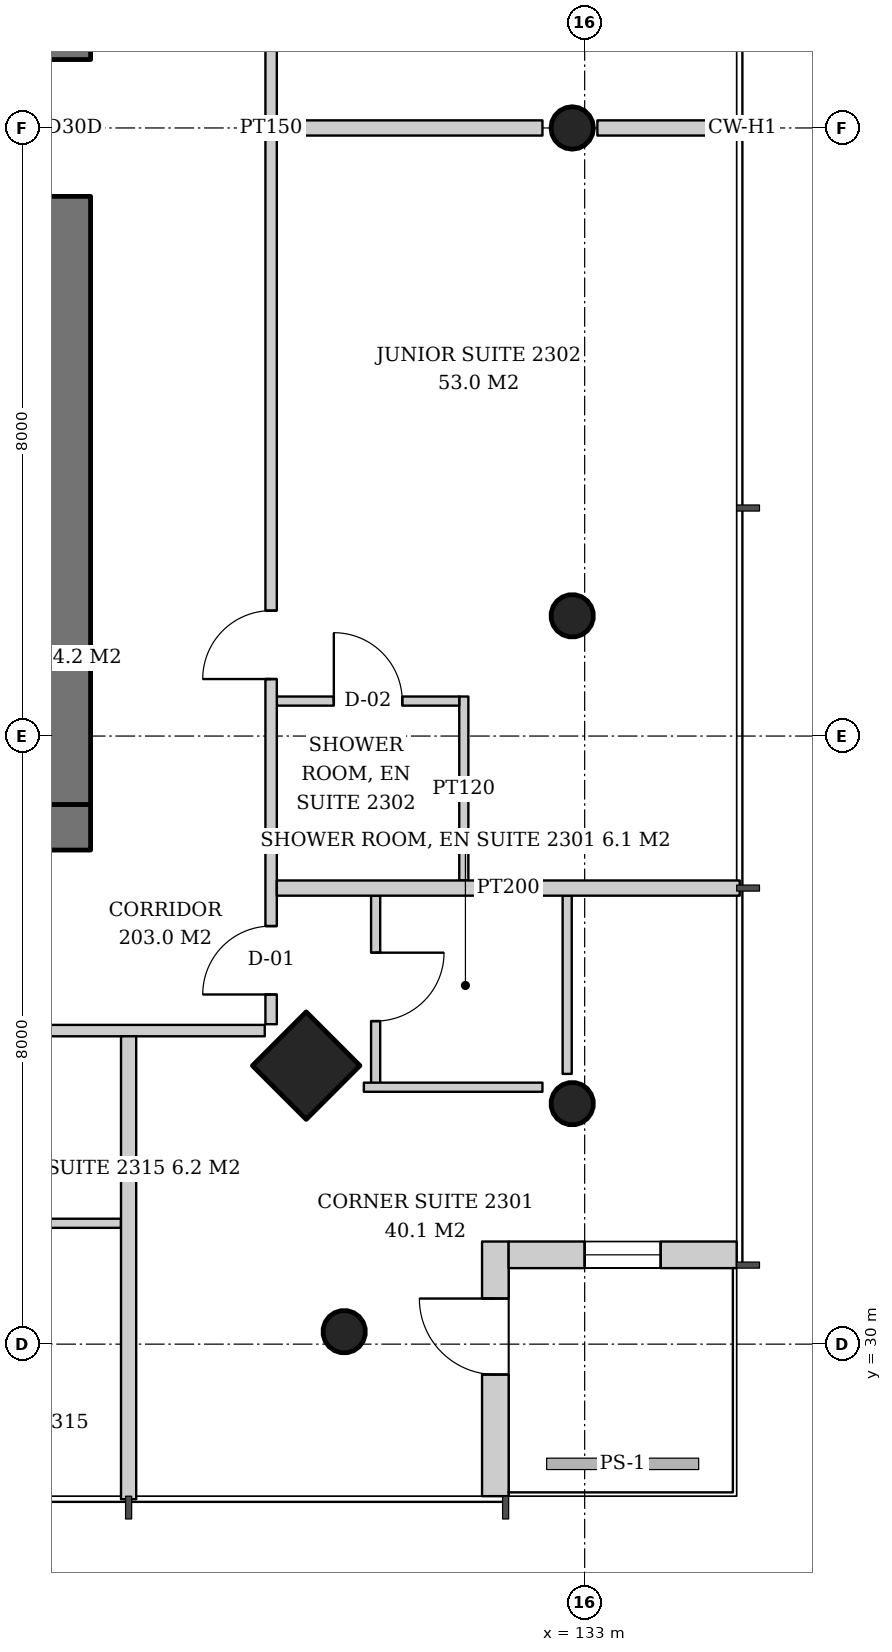
"""IFC4 building model, lengths in metres.
Left out: names, types, materials, properties, quantities, classifications, styles, units other than length and angle.
Written with IfcOpenShell. Run it as: python <this file> out.ifc"""

import sys

from ifc_helpers import new_model, si_unit, direction, frame, frame_2d, origin, origin_2d, place, context, subcontext, project, spatial, rectangle, hollow_circle, extrude, element, fill, save


model = new_model("IFC4")
c1 = context("Model", 3, precision=1e-05, world=origin(), true_north=direction((0.0, 1.0)))
c2 = subcontext(c1, "Body", "Model", "MODEL_VIEW")
j1 = project(units=[si_unit("LENGTHUNIT", "METRE"), si_unit("PLANEANGLEUNIT", "RADIAN")], contexts=[c1])
p1 = place(None, origin())
s1 = spatial("IfcSite", under=j1, at=p1, CompositionType="ELEMENT")
p2 = place(p1, origin())
s2 = spatial("IfcBuilding", under=s1, at=p2, CompositionType="ELEMENT")
p3 = place(p2, frame((0.0, 0.0, 93.2)))
s3 = spatial("IfcBuildingStorey", under=s2, at=p3, CompositionType="ELEMENT", Elevation=93.2)
p4 = place(p3, frame((132.888, 33.112, 0.0), z_axis=(-0.043029647111, 0.043029647111, 0.998146732169), x_axis=(-0.707106781187, -0.707106781187, 0.0)))
e1 = element("IfcColumn", 1, at=p4, inside=s3, PredefinedType="COLUMN", context=c2, shape_type="SweptSolid", body=[
    extrude(hollow_circle(Radius=0.28, WallThickness=0.02, at=origin_2d()), origin(), (0.0, 0.0, 1.0), 3.807),
])
p5 = place(p3, frame((132.888, 39.556, 0.0), z_axis=(-0.043059584825, 0.021497706284, 0.998841188968), x_axis=(-0.446680166538, -0.894693706707, 0.0)))
e2 = element("IfcColumn", 2, at=p5, inside=s3, PredefinedType="COLUMN", context=c2, shape_type="SweptSolid", body=[
    extrude(hollow_circle(Radius=0.28, WallThickness=0.02, at=origin_2d()), origin(), (0.0, 0.0, 1.0), 3.804),
])
p6 = place(p3, frame((132.888, 46.0, 0.0), z_axis=(-0.043069538298, 0.0, 0.999072076915), x_axis=(0.0, -1.0, 0.0)))
e3 = element("IfcColumn", 3, at=p6, inside=s3, PredefinedType="COLUMN", context=c2, shape_type="SweptSolid", body=[
    extrude(hollow_circle(Radius=0.28, WallThickness=0.02, at=origin_2d()), origin(), (0.0, 0.0, 1.0), 3.803),
])
p7 = place(p3, frame((129.388, 33.612, 0.0), z_axis=(-0.043029647111, 0.043029647111, 0.998146732169), x_axis=(-0.707106781187, -0.707106781187, 0.0)))
e4 = element("IfcColumn", 4, at=p7, inside=s3, PredefinedType="COLUMN", context=c2, shape_type="SweptSolid", body=[
    extrude(rectangle(XDim=1.0, YDim=1.0, at=origin_2d()), origin(), (0.0, 0.0, 1.0), 3.807),
])
p8 = place(p3, frame((129.888, 30.112, 0.0), z_axis=(-0.043029647111, 0.043029647111, 0.998146732169), x_axis=(-0.707106781187, -0.707106781187, 0.0)))
e5 = element("IfcColumn", 5, at=p8, inside=s3, PredefinedType="COLUMN", context=c2, shape_type="SweptSolid", body=[
    extrude(hollow_circle(Radius=0.28, WallThickness=0.02, at=origin_2d()), origin(), (0.0, 0.0, 1.0), 3.807),
])
p9 = place(p3, frame((107.5, 36.8, 0.0), z_axis=(0.0, 0.0, 1.0), x_axis=(1.0, 0.0, 0.0)))
e6 = element("IfcWall", 6, at=p9, inside=s3, PredefinedType="SHEAR", context=c2, shape_type="SweptSolid", body=[
    extrude(rectangle(XDim=19.0, YDim=0.6, at=frame_2d((9.5, 0.0))), origin(), (0.0, 0.0, 1.0), 3.8),
])
p10 = place(p9, frame((3.9, 0.0, 0.0)))
e7 = element("IfcOpeningElement", 7, at=p10, cuts=e6, PredefinedType="OPENING", context=c2, shape_type="SweptSolid", body=[
    extrude(rectangle(XDim=1.0, YDim=2.1, at=frame_2d((0.5, 1.05))), frame((0.0, 0.31, 0.0), z_axis=(0.0, -1.0, 0.0), x_axis=(1.0, 0.0, 0.0)), (0.0, 0.0, 1.0), 0.62),
])
p11 = place(p9, frame((14.107, 0.0, 0.0)))
e8 = element("IfcOpeningElement", 8, at=p11, cuts=e6, PredefinedType="OPENING", context=c2, shape_type="SweptSolid", body=[
    extrude(rectangle(XDim=1.0, YDim=2.1, at=frame_2d((0.5, 1.05))), frame((0.0, 0.31, 0.0), z_axis=(0.0, -1.0, 0.0), x_axis=(1.0, 0.0, 0.0)), (0.0, 0.0, 1.0), 0.62),
])
p12 = place(p9, frame((15.638, 0.0, 0.0)))
e9 = element("IfcOpeningElement", 9, at=p12, cuts=e6, PredefinedType="OPENING", context=c2, shape_type="SweptSolid", body=[
    extrude(rectangle(XDim=1.0, YDim=2.1, at=frame_2d((0.5, 1.05))), frame((0.0, 0.31, 0.0), z_axis=(0.0, -1.0, 0.0), x_axis=(1.0, 0.0, 0.0)), (0.0, 0.0, 1.0), 0.62),
])
p13 = place(p9, frame((17.142, 0.0, 0.0)))
e10 = element("IfcOpeningElement", 10, at=p13, cuts=e6, PredefinedType="OPENING", context=c2, shape_type="SweptSolid", body=[
    extrude(rectangle(XDim=1.0, YDim=2.1, at=frame_2d((0.5, 1.05))), frame((0.0, 0.31, 0.0), z_axis=(0.0, -1.0, 0.0), x_axis=(1.0, 0.0, 0.0)), (0.0, 0.0, 1.0), 0.62),
])
p14 = place(p3, frame((126.2, 37.1, 0.0), z_axis=(0.0, 0.0, 1.0), x_axis=(0.0, 1.0, 0.0)))
e11 = element("IfcWall", 11, at=p14, inside=s3, PredefinedType="SHEAR", context=c2, shape_type="SweptSolid", body=[
    extrude(rectangle(XDim=17.8, YDim=0.6, at=frame_2d((8.9, 0.0))), origin(), (0.0, 0.0, 1.0), 3.8),
])
p15 = place(p14, frame((8.0, 0.0, 0.0)))
e12 = element("IfcOpeningElement", 12, at=p15, cuts=e11, PredefinedType="OPENING", context=c2, shape_type="SweptSolid", body=[
    extrude(rectangle(XDim=1.8, YDim=2.4, at=frame_2d((0.9, 1.2))), frame((0.0, 0.31, 0.0), z_axis=(0.0, -1.0, 0.0), x_axis=(1.0, 0.0, 0.0)), (0.0, 0.0, 1.0), 0.62),
])
p16 = place(p3, frame((131.825, 28.0, 0.0), z_axis=(0.0, 0.0, 1.0), x_axis=(0.0, 1.0, 0.0)))
e13 = element("IfcWall", 13, at=p16, inside=s3, PredefinedType="SOLIDWALL", context=c2, shape_type="SweptSolid", body=[
    extrude(rectangle(XDim=3.35, YDim=0.35, at=frame_2d((1.675, 0.0))), origin(), (0.0, 0.0, 1.0), 3.6),
])
p17 = place(p16, frame((1.6, 0.0, 0.0)))
e14 = element("IfcOpeningElement", 14, at=p17, cuts=e13, PredefinedType="OPENING", context=c2, shape_type="SweptSolid", body=[
    extrude(rectangle(XDim=1.0, YDim=2.4, at=frame_2d((0.5, 1.2))), frame((0.0, 0.185, 0.0), z_axis=(0.0, -1.0, 0.0), x_axis=(1.0, 0.0, 0.0)), (0.0, 0.0, 1.0), 0.37),
])
p18 = place(p3, frame((132.0, 31.175, 0.0), z_axis=(0.0, 0.0, 1.0), x_axis=(1.0, 0.0, 0.0)))
e15 = element("IfcWall", 15, at=p18, inside=s3, PredefinedType="SOLIDWALL", context=c2, shape_type="SweptSolid", body=[
    extrude(rectangle(XDim=3.0, YDim=0.35, at=frame_2d((1.5, 0.0))), origin(), (0.0, 0.0, 1.0), 3.6),
])
p19 = place(p18, frame((1.0, 0.0, 0.9)))
e16 = element("IfcOpeningElement", 16, at=p19, cuts=e15, PredefinedType="OPENING", context=c2, shape_type="SweptSolid", body=[
    extrude(rectangle(XDim=1.0, YDim=2.4, at=frame_2d((0.5, 1.2))), frame((0.0, 0.185, 0.0), z_axis=(0.0, -1.0, 0.0), x_axis=(1.0, 0.0, 0.0)), (0.0, 0.0, 1.0), 0.37),
])
p20 = place(p3, frame((130.25, 35.9, 0.0), z_axis=(0.0, 0.0, 1.0), x_axis=(0.0, -1.0, 0.0)))
e17 = element("IfcWall", 17, at=p20, inside=s3, PredefinedType="PARTITIONING", context=c2, shape_type="SweptSolid", body=[
    extrude(rectangle(XDim=2.58, YDim=0.12, at=frame_2d((1.29, 0.0))), origin(), (0.0, 0.0, 1.0), 3.2),
])
p21 = place(p20, frame((0.75, 0.0, 0.0)))
e18 = element("IfcOpeningElement", 18, at=p21, cuts=e17, PredefinedType="OPENING", context=c2, shape_type="SweptSolid", body=[
    extrude(rectangle(XDim=0.9, YDim=2.1, at=frame_2d((0.45, 1.05))), frame((0.0, 0.07, 0.0), z_axis=(0.0, -1.0, 0.0), x_axis=(1.0, 0.0, 0.0)), (0.0, 0.0, 1.0), 0.14),
])
p22 = place(p3, frame((132.77, 35.9, 0.0), z_axis=(0.0, 0.0, 1.0), x_axis=(0.0, -1.0, 0.0)))
e19 = element("IfcWall", 19, at=p22, inside=s3, PredefinedType="PARTITIONING", context=c2, shape_type="SweptSolid", body=[
    extrude(rectangle(XDim=2.344, YDim=0.12, at=frame_2d((1.172, 0.0))), origin(), (0.0, 0.0, 1.0), 3.2),
])
p23 = place(p3, frame((130.095, 33.38, 0.0), z_axis=(0.0, 0.0, 1.0), x_axis=(1.0, 0.0, 0.0)))
e20 = element("IfcWall", 20, at=p23, inside=s3, PredefinedType="PARTITIONING", context=c2, shape_type="SweptSolid", body=[
    extrude(rectangle(XDim=2.35, YDim=0.12, at=frame_2d((1.175, 0.0))), origin(), (0.0, 0.0, 1.0), 3.2),
])
p24 = place(p3, frame((131.41, 36.1, 0.0), z_axis=(0.0, 0.0, 1.0), x_axis=(0.0, 1.0, 0.0)))
e21 = element("IfcWall", 21, at=p24, inside=s3, PredefinedType="PARTITIONING", context=c2, shape_type="SweptSolid", body=[
    extrude(rectangle(XDim=2.42, YDim=0.12, at=frame_2d((1.21, 0.0))), origin(), (0.0, 0.0, 1.0), 2.9),
])
p25 = place(p3, frame((128.95, 38.46, 0.0), z_axis=(0.0, 0.0, 1.0), x_axis=(1.0, 0.0, 0.0)))
e22 = element("IfcWall", 22, at=p25, inside=s3, PredefinedType="PARTITIONING", context=c2, shape_type="SweptSolid", body=[
    extrude(rectangle(XDim=2.4, YDim=0.12, at=frame_2d((1.2, 0.0))), origin(), (0.0, 0.0, 1.0), 3.6),
])
p26 = place(p25, frame((0.75, 0.0, 0.0)))
e23 = element("IfcOpeningElement", 23, at=p26, cuts=e22, PredefinedType="OPENING", context=c2, shape_type="SweptSolid", body=[
    extrude(rectangle(XDim=0.9, YDim=2.1, at=frame_2d((0.45, 1.05))), frame((0.0, 0.07, 0.0), z_axis=(0.0, -1.0, 0.0), x_axis=(1.0, 0.0, 0.0)), (0.0, 0.0, 1.0), 0.14),
])
p27 = place(p3, frame((128.875, 34.209, 0.0), z_axis=(0.0, 0.0, 1.0), x_axis=(0.0, 1.0, 0.0)))
e24 = element("IfcWall", 24, at=p27, inside=s3, PredefinedType="PARTITIONING", context=c2, shape_type="SweptSolid", body=[
    extrude(rectangle(XDim=23.583, YDim=0.15, at=frame_2d((11.791, 0.0))), origin(), (0.0, 0.0, 1.0), 2.9),
])
p28 = place(p27, frame((0.391, 0.0, 0.0)))
e25 = element("IfcOpeningElement", 25, at=p28, cuts=e24, PredefinedType="OPENING", context=c2, shape_type="SweptSolid", body=[
    extrude(rectangle(XDim=0.9, YDim=2.1, at=frame_2d((0.45, 1.05))), frame((0.0, 0.085, 0.0), z_axis=(0.0, -1.0, 0.0), x_axis=(1.0, 0.0, 0.0)), (0.0, 0.0, 1.0), 0.17),
])
p29 = place(p27, frame((4.541, 0.0, 0.0)))
e26 = element("IfcOpeningElement", 26, at=p29, cuts=e24, PredefinedType="OPENING", context=c2, shape_type="SweptSolid", body=[
    extrude(rectangle(XDim=0.9, YDim=2.1, at=frame_2d((0.45, 1.05))), frame((0.0, 0.085, 0.0), z_axis=(0.0, -1.0, 0.0), x_axis=(1.0, 0.0, 0.0)), (0.0, 0.0, 1.0), 0.17),
])
p30 = place(p27, frame((12.891, 0.0, 0.0)))
e27 = element("IfcOpeningElement", 27, at=p30, cuts=e24, PredefinedType="OPENING", context=c2, shape_type="SweptSolid", body=[
    extrude(rectangle(XDim=0.9, YDim=2.1, at=frame_2d((0.45, 1.05))), frame((0.0, 0.085, 0.0), z_axis=(0.0, -1.0, 0.0), x_axis=(1.0, 0.0, 0.0)), (0.0, 0.0, 1.0), 0.17),
])
p31 = place(p27, frame((19.541, 0.0, 0.0)))
e28 = element("IfcOpeningElement", 28, at=p31, cuts=e24, PredefinedType="OPENING", context=c2, shape_type="SweptSolid", body=[
    extrude(rectangle(XDim=0.9, YDim=2.1, at=frame_2d((0.45, 1.05))), frame((0.0, 0.085, 0.0), z_axis=(0.0, -1.0, 0.0), x_axis=(1.0, 0.0, 0.0)), (0.0, 0.0, 1.0), 0.17),
])
p32 = place(p3, frame((128.95, 36.0, 0.0), z_axis=(0.0, 0.0, 1.0), x_axis=(1.0, 0.0, 0.0)))
e29 = element("IfcWall", 29, at=p32, inside=s3, PredefinedType="PARTITIONING", context=c2, shape_type="SweptSolid", body=[
    extrude(rectangle(XDim=6.09, YDim=0.2, at=frame_2d((3.045, 0.0))), origin(), (0.0, 0.0, 1.0), 3.2),
])
p33 = place(p3, frame((128.95, 46.0, 0.0), z_axis=(0.0, 0.0, 1.0), x_axis=(1.0, 0.0, 0.0)))
e30 = element("IfcWall", 30, at=p33, inside=s3, PredefinedType="PARTITIONING", context=c2, shape_type="SweptSolid", body=[
    extrude(rectangle(XDim=3.495, YDim=0.2, at=frame_2d((1.747, 0.0))), origin(), (0.0, 0.0, 1.0), 3.6),
])
p34 = place(p3, frame((133.167, 46.0, 0.0), z_axis=(0.0, 0.0, 1.0), x_axis=(1.0, 0.0, 0.0)))
e31 = element("IfcWall", 31, at=p34, inside=s3, PredefinedType="PARTITIONING", context=c2, shape_type="SweptSolid", body=[
    extrude(rectangle(XDim=1.873, YDim=0.2, at=frame_2d((0.936, 0.0))), origin(), (0.0, 0.0, 1.0), 3.6),
])
p35 = place(p3, frame((124.48, 31.59, 0.0), z_axis=(0.0, 0.0, 1.0), x_axis=(1.0, 0.0, 0.0)))
e32 = element("IfcWall", 32, at=p35, inside=s3, PredefinedType="PARTITIONING", context=c2, shape_type="SweptSolid", body=[
    extrude(rectangle(XDim=2.42, YDim=0.12, at=frame_2d((1.21, 0.0))), origin(), (0.0, 0.0, 1.0), 3.0),
])
p36 = place(p3, frame((105.209, 34.125, 0.0), z_axis=(0.0, 0.0, 1.0), x_axis=(1.0, 0.0, 0.0)))
e33 = element("IfcWall", 33, at=p36, inside=s3, PredefinedType="PARTITIONING", context=c2, shape_type="SweptSolid", body=[
    extrude(rectangle(XDim=23.583, YDim=0.15, at=frame_2d((11.791, 0.0))), origin(), (0.0, 0.0, 1.0), 2.9),
])
p37 = place(p36, frame((0.391, 0.0, 0.0)))
e34 = element("IfcOpeningElement", 34, at=p37, cuts=e33, PredefinedType="OPENING", context=c2, shape_type="SweptSolid", body=[
    extrude(rectangle(XDim=0.9, YDim=2.1, at=frame_2d((0.45, 1.05))), frame((0.0, 0.085, 0.0), z_axis=(0.0, -1.0, 0.0), x_axis=(1.0, 0.0, 0.0)), (0.0, 0.0, 1.0), 0.17),
])
p38 = place(p36, frame((4.541, 0.0, 0.0)))
e35 = element("IfcOpeningElement", 35, at=p38, cuts=e33, PredefinedType="OPENING", context=c2, shape_type="SweptSolid", body=[
    extrude(rectangle(XDim=0.9, YDim=2.1, at=frame_2d((0.45, 1.05))), frame((0.0, 0.085, 0.0), z_axis=(0.0, -1.0, 0.0), x_axis=(1.0, 0.0, 0.0)), (0.0, 0.0, 1.0), 0.17),
])
p39 = place(p36, frame((14.541, 0.0, 0.0)))
e36 = element("IfcOpeningElement", 36, at=p39, cuts=e33, PredefinedType="OPENING", context=c2, shape_type="SweptSolid", body=[
    extrude(rectangle(XDim=0.9, YDim=2.1, at=frame_2d((0.45, 1.05))), frame((0.0, 0.085, 0.0), z_axis=(0.0, -1.0, 0.0), x_axis=(1.0, 0.0, 0.0)), (0.0, 0.0, 1.0), 0.17),
])
p40 = place(p36, frame((18.141, 0.0, 0.0)))
e37 = element("IfcOpeningElement", 37, at=p40, cuts=e33, PredefinedType="OPENING", context=c2, shape_type="SweptSolid", body=[
    extrude(rectangle(XDim=0.9, YDim=2.1, at=frame_2d((0.45, 1.05))), frame((0.0, 0.085, 0.0), z_axis=(0.0, -1.0, 0.0), x_axis=(1.0, 0.0, 0.0)), (0.0, 0.0, 1.0), 0.17),
])
p41 = place(p3, frame((127.0, 34.05, 0.0), z_axis=(0.0, 0.0, 1.0), x_axis=(0.0, -1.0, 0.0)))
e38 = element("IfcWall", 38, at=p41, inside=s3, PredefinedType="PARTITIONING", context=c2, shape_type="SweptSolid", body=[
    extrude(rectangle(XDim=6.09, YDim=0.2, at=frame_2d((3.045, 0.0))), origin(), (0.0, 0.0, 1.0), 3.2),
])
p42 = place(p17, origin())
e39 = element("IfcDoor", 39, at=p42, inside=s3, OperationType="SINGLE_SWING_RIGHT", PredefinedType="DOOR", context=c2, shape_type="SweptSolid", body=[
    extrude(rectangle(XDim=1.0, YDim=2.4, at=frame_2d((0.5, 1.2))), frame((0.0, 0.025, 0.0), z_axis=(0.0, -1.0, 0.0), x_axis=(1.0, 0.0, 0.0)), (0.0, 0.0, 1.0), 0.05),
])
fill(e14, e39)
p43 = place(p19, origin())
e40 = element("IfcWindow", 40, at=p43, inside=s3, PartitioningType="SINGLE_PANEL", PredefinedType="WINDOW", context=c2, shape_type="SweptSolid", body=[
    extrude(rectangle(XDim=1.0, YDim=2.4, at=frame_2d((0.5, 1.2))), frame((0.0, 0.03, 0.0), z_axis=(0.0, -1.0, 0.0), x_axis=(1.0, 0.0, 0.0)), (0.0, 0.0, 1.0), 0.06),
])
fill(e16, e40)
p44 = place(p15, origin())
e41 = element("IfcDoor", 41, at=p44, inside=s3, OperationType="DOUBLE_DOOR_SINGLE_SWING", PredefinedType="DOOR", context=c2, shape_type="SweptSolid", body=[
    extrude(rectangle(XDim=1.8, YDim=2.4, at=frame_2d((0.9, 1.2))), frame((0.0, 0.025, 0.0), z_axis=(0.0, -1.0, 0.0), x_axis=(1.0, 0.0, 0.0)), (0.0, 0.0, 1.0), 0.05),
])
fill(e12, e41)
p45 = place(p21, origin())
e42 = element("IfcDoor", 42, at=p45, inside=s3, OperationType="SINGLE_SWING_LEFT", PredefinedType="DOOR", context=c2, shape_type="SweptSolid", body=[
    extrude(rectangle(XDim=0.9, YDim=2.1, at=frame_2d((0.45, 1.05))), frame((0.0, 0.025, 0.0), z_axis=(0.0, -1.0, 0.0), x_axis=(1.0, 0.0, 0.0)), (0.0, 0.0, 1.0), 0.05),
])
fill(e18, e42)
p46 = place(p26, origin())
e43 = element("IfcDoor", 43, at=p46, inside=s3, OperationType="SINGLE_SWING_LEFT", PredefinedType="DOOR", context=c2, shape_type="SweptSolid", body=[
    extrude(rectangle(XDim=0.9, YDim=2.1, at=frame_2d((0.45, 1.05))), frame((0.0, 0.025, 0.0), z_axis=(0.0, -1.0, 0.0), x_axis=(1.0, 0.0, 0.0)), (0.0, 0.0, 1.0), 0.05),
])
fill(e23, e43)
p47 = place(p28, origin())
e44 = element("IfcDoor", 44, at=p47, inside=s3, OperationType="SINGLE_SWING_LEFT", PredefinedType="DOOR", context=c2, shape_type="SweptSolid", body=[
    extrude(rectangle(XDim=0.9, YDim=2.1, at=frame_2d((0.45, 1.05))), frame((0.0, 0.025, 0.0), z_axis=(0.0, -1.0, 0.0), x_axis=(1.0, 0.0, 0.0)), (0.0, 0.0, 1.0), 0.05),
])
fill(e25, e44)
p48 = place(p29, origin())
e45 = element("IfcDoor", 45, at=p48, inside=s3, OperationType="SINGLE_SWING_LEFT", PredefinedType="DOOR", context=c2, shape_type="SweptSolid", body=[
    extrude(rectangle(XDim=0.9, YDim=2.1, at=frame_2d((0.45, 1.05))), frame((0.0, 0.025, 0.0), z_axis=(0.0, -1.0, 0.0), x_axis=(1.0, 0.0, 0.0)), (0.0, 0.0, 1.0), 0.05),
])
fill(e26, e45)
save(model, sys.argv[1])
